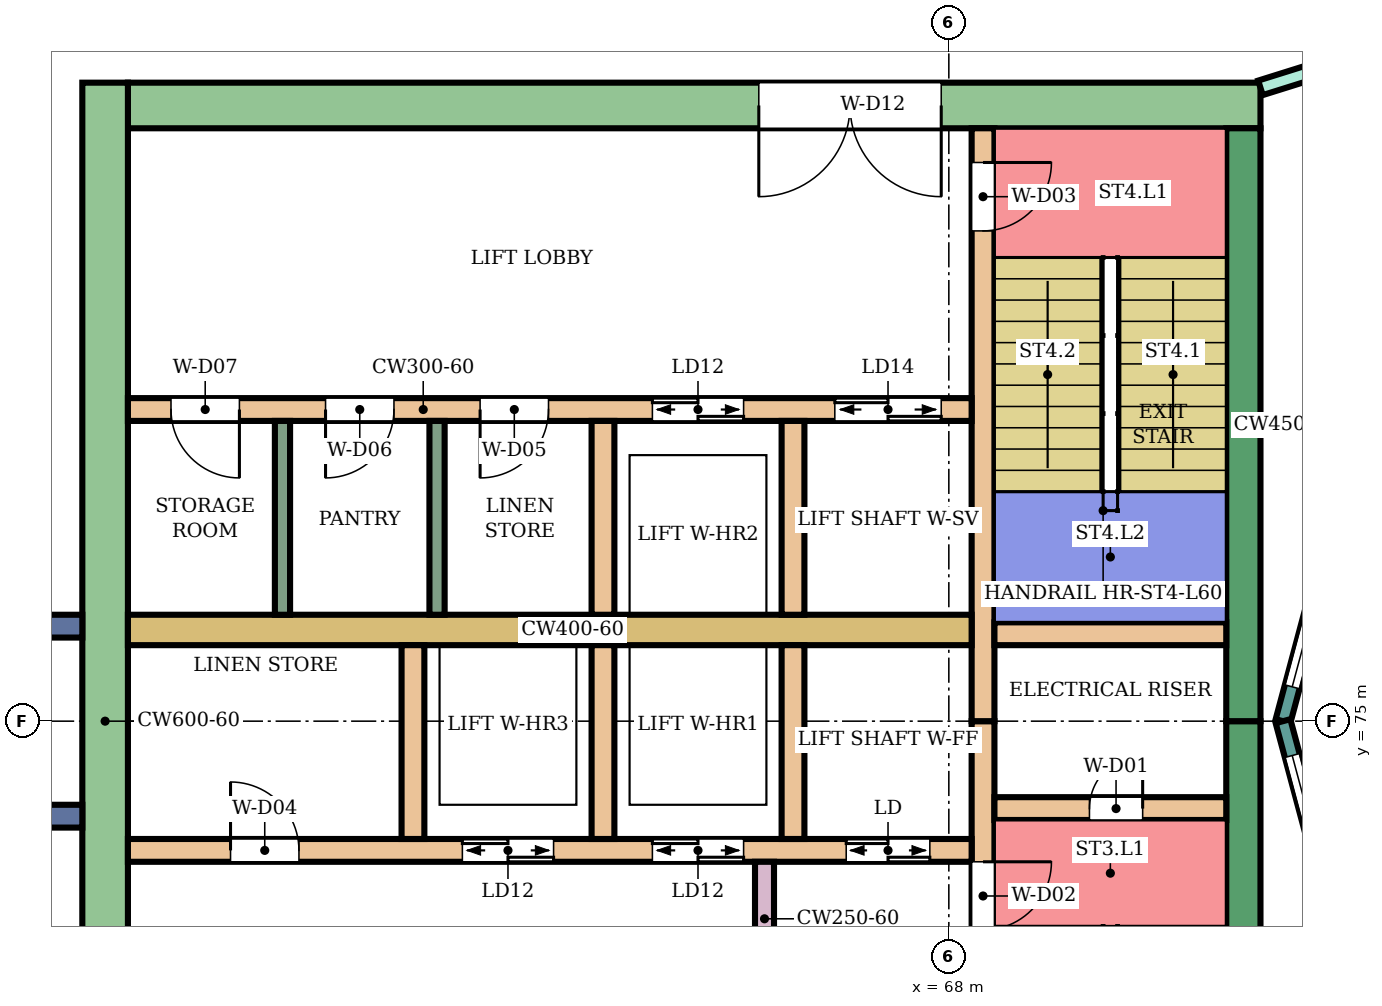
"""IFC4 building model, lengths in metres.
Left out: names, types, materials, properties, quantities, classifications, styles, units other than length and angle.
Written with IfcOpenShell. Run it as: python <this file> out.ifc"""

import sys

from ifc_helpers import new_model, si_unit, direction, frame, frame_2d, origin, place, context, subcontext, project, spatial, rectangle, extrude, element, fill, save


model = new_model("IFC4")
c1 = context("Model", 3, precision=1e-05, world=origin(), true_north=direction((0.0, 1.0)))
c2 = subcontext(c1, "Body", "Model", "MODEL_VIEW")
j1 = project(units=[si_unit("LENGTHUNIT", "METRE"), si_unit("PLANEANGLEUNIT", "RADIAN")], contexts=[c1])
p1 = place(None, origin())
s1 = spatial("IfcSite", under=j1, at=p1, CompositionType="ELEMENT")
p2 = place(p1, origin())
s2 = spatial("IfcBuilding", under=s1, at=p2, CompositionType="ELEMENT")
p3 = place(p2, frame((0.0, 0.0, 262.5)))
s3 = spatial("IfcBuildingStorey", under=s2, at=p3, CompositionType="ELEMENT", Elevation=262.5)
p4 = place(p3, frame((72.1, 83.1, 0.0), z_axis=(0.0, 0.0, 1.0), x_axis=(-1.0, 0.0, 0.0)))
e1 = element("IfcWall", 1, at=p4, inside=s3, PredefinedType="SHEAR", context=c2, shape_type="SweptSolid", body=[
    extrude(rectangle(XDim=14.9, YDim=0.6, at=frame_2d((7.45, 0.0))), origin(), (0.0, 0.0, 1.0), 3.88),
])
p5 = place(p4, frame((4.2, 0.0, 0.0)))
e2 = element("IfcOpeningElement", 2, at=p5, cuts=e1, PredefinedType="OPENING", context=c2, shape_type="SweptSolid", body=[
    extrude(rectangle(XDim=2.4, YDim=2.4, at=frame_2d((1.2, 1.2))), frame((0.0, 0.31, 0.0), z_axis=(0.0, -1.0, 0.0), x_axis=(1.0, 0.0, 0.0)), (0.0, 0.0, 1.0), 0.62),
])
for number, where, z_axis, x_axis in (
    (3, (71.875, 75.0, 0.0), (0.0, 0.0, 1.0), (0.0, -1.0, 0.0)),
    (4, (71.875, 82.8, 0.0), (0.0, 0.0, 1.0), (0.0, -1.0, 0.0)),
):
    element("IfcWall", number, at=place(p3, frame(where, z_axis=z_axis, x_axis=x_axis)), inside=s3, PredefinedType="SHEAR", context=c2, shape_type="SweptSolid", body=[
        extrude(rectangle(XDim=7.8, YDim=0.45, at=frame_2d((3.9, 0.0))), origin(), (0.0, 0.0, 1.0), 3.88),
    ])
p6 = place(p3, frame((56.9, 83.4, 0.0), z_axis=(0.0, 0.0, 1.0), x_axis=(0.0, -1.0, 0.0)))
e5 = element("IfcWall", 5, at=p6, inside=s3, PredefinedType="SHEAR", context=c2, shape_type="SweptSolid", body=[
    extrude(rectangle(XDim=16.8, YDim=0.6, at=frame_2d((8.4, 0.0))), origin(), (0.0, 0.0, 1.0), 3.88),
])
p7 = place(p3, frame((68.45, 75.0, 0.0), z_axis=(0.0, 0.0, 1.0), x_axis=(0.0, -1.0, 0.0)))
e6 = element("IfcWall", 6, at=p7, inside=s3, PredefinedType="SHEAR", context=c2, shape_type="SweptSolid", body=[
    extrude(rectangle(XDim=7.8, YDim=0.3, at=frame_2d((3.9, 0.0))), origin(), (0.0, 0.0, 1.0), 3.88),
])
p8 = place(p7, frame((1.85, 0.0, 0.0)))
e7 = element("IfcOpeningElement", 7, at=p8, cuts=e6, PredefinedType="OPENING", context=c2, shape_type="SweptSolid", body=[
    extrude(rectangle(XDim=0.9, YDim=2.1, at=frame_2d((0.45, 1.05))), frame((0.0, 0.16, 0.0), z_axis=(0.0, -1.0, 0.0), x_axis=(1.0, 0.0, 0.0)), (0.0, 0.0, 1.0), 0.32),
])
p9 = place(p3, frame((68.45, 82.8, 0.0), z_axis=(0.0, 0.0, 1.0), x_axis=(0.0, -1.0, 0.0)))
e8 = element("IfcWall", 8, at=p9, inside=s3, PredefinedType="SHEAR", context=c2, shape_type="SweptSolid", body=[
    extrude(rectangle(XDim=7.8, YDim=0.3, at=frame_2d((3.9, 0.0))), origin(), (0.0, 0.0, 1.0), 3.88),
])
p10 = place(p9, frame((0.45, 0.0, 0.0)))
e9 = element("IfcOpeningElement", 9, at=p10, cuts=e8, PredefinedType="OPENING", context=c2, shape_type="SweptSolid", body=[
    extrude(rectangle(XDim=0.9, YDim=2.1, at=frame_2d((0.45, 1.05))), frame((0.0, 0.16, 0.0), z_axis=(0.0, -1.0, 0.0), x_axis=(1.0, 0.0, 0.0)), (0.0, 0.0, 1.0), 0.32),
])
p11 = place(p3, frame((71.65, 73.85, 0.0), z_axis=(0.0, 0.0, 1.0), x_axis=(-1.0, 0.0, 0.0)))
e10 = element("IfcWall", 10, at=p11, inside=s3, PredefinedType="SHEAR", context=c2, shape_type="SweptSolid", body=[
    extrude(rectangle(XDim=3.05, YDim=0.3, at=frame_2d((1.525, 0.0))), origin(), (0.0, 0.0, 1.0), 3.88),
])
p12 = place(p11, frame((1.1, 0.0, 0.0)))
e11 = element("IfcOpeningElement", 11, at=p12, cuts=e10, PredefinedType="OPENING", context=c2, shape_type="SweptSolid", body=[
    extrude(rectangle(XDim=0.7, YDim=2.0, at=frame_2d((0.35, 1.0))), frame((0.0, 0.16, 0.0), z_axis=(0.0, -1.0, 0.0), x_axis=(1.0, 0.0, 0.0)), (0.0, 0.0, 1.0), 0.32),
])
p13 = place(p3, frame((71.65, 76.15, 0.0), z_axis=(0.0, 0.0, 1.0), x_axis=(-1.0, 0.0, 0.0)))
e12 = element("IfcWall", 12, at=p13, inside=s3, PredefinedType="SHEAR", context=c2, shape_type="SweptSolid", body=[
    extrude(rectangle(XDim=3.05, YDim=0.3, at=frame_2d((1.525, 0.0))), origin(), (0.0, 0.0, 1.0), 3.88),
])
p14 = place(p3, frame((68.3, 73.3, 0.0), z_axis=(0.0, 0.0, 1.0), x_axis=(-1.0, 0.0, 0.0)))
e13 = element("IfcWall", 13, at=p14, inside=s3, PredefinedType="SHEAR", context=c2, shape_type="SweptSolid", body=[
    extrude(rectangle(XDim=11.1, YDim=0.3, at=frame_2d((5.55, 0.0))), origin(), (0.0, 0.0, 1.0), 3.88),
])
p15 = place(p14, frame((0.55, 0.0, 0.0)))
e14 = element("IfcOpeningElement", 14, at=p15, cuts=e13, PredefinedType="OPENING", context=c2, shape_type="SweptSolid", body=[
    extrude(rectangle(XDim=1.1, YDim=2.1, at=frame_2d((0.55, 1.05))), frame((0.0, 0.16, 0.0), z_axis=(0.0, -1.0, 0.0), x_axis=(1.0, 0.0, 0.0)), (0.0, 0.0, 1.0), 0.32),
])
p16 = place(p14, frame((3.0, 0.0, 0.0)))
e15 = element("IfcOpeningElement", 15, at=p16, cuts=e13, PredefinedType="OPENING", context=c2, shape_type="SweptSolid", body=[
    extrude(rectangle(XDim=1.2, YDim=2.1, at=frame_2d((0.6, 1.05))), frame((0.0, 0.16, 0.0), z_axis=(0.0, -1.0, 0.0), x_axis=(1.0, 0.0, 0.0)), (0.0, 0.0, 1.0), 0.32),
])
p17 = place(p14, frame((5.5, 0.0, 0.0)))
e16 = element("IfcOpeningElement", 16, at=p17, cuts=e13, PredefinedType="OPENING", context=c2, shape_type="SweptSolid", body=[
    extrude(rectangle(XDim=1.2, YDim=2.1, at=frame_2d((0.6, 1.05))), frame((0.0, 0.16, 0.0), z_axis=(0.0, -1.0, 0.0), x_axis=(1.0, 0.0, 0.0)), (0.0, 0.0, 1.0), 0.32),
])
p18 = place(p14, frame((8.85, 0.0, 0.0)))
e17 = element("IfcOpeningElement", 17, at=p18, cuts=e13, PredefinedType="OPENING", context=c2, shape_type="SweptSolid", body=[
    extrude(rectangle(XDim=0.9, YDim=2.1, at=frame_2d((0.45, 1.05))), frame((0.0, 0.16, 0.0), z_axis=(0.0, -1.0, 0.0), x_axis=(1.0, 0.0, 0.0)), (0.0, 0.0, 1.0), 0.32),
])
p19 = place(p3, frame((68.3, 76.2, 0.0), z_axis=(0.0, 0.0, 1.0), x_axis=(-1.0, 0.0, 0.0)))
e18 = element("IfcWall", 18, at=p19, inside=s3, PredefinedType="SHEAR", context=c2, shape_type="SweptSolid", body=[
    extrude(rectangle(XDim=11.1, YDim=0.4, at=frame_2d((5.55, 0.0))), origin(), (0.0, 0.0, 1.0), 3.88),
])
p20 = place(p3, frame((68.3, 79.1, 0.0), z_axis=(0.0, 0.0, 1.0), x_axis=(-1.0, 0.0, 0.0)))
e19 = element("IfcWall", 19, at=p20, inside=s3, PredefinedType="SHEAR", context=c2, shape_type="SweptSolid", body=[
    extrude(rectangle(XDim=11.1, YDim=0.3, at=frame_2d((5.55, 0.0))), origin(), (0.0, 0.0, 1.0), 3.88),
])
p21 = place(p20, frame((0.4, 0.0, 0.0)))
e20 = element("IfcOpeningElement", 20, at=p21, cuts=e19, PredefinedType="OPENING", context=c2, shape_type="SweptSolid", body=[
    extrude(rectangle(XDim=1.4, YDim=2.1, at=frame_2d((0.7, 1.05))), frame((0.0, 0.16, 0.0), z_axis=(0.0, -1.0, 0.0), x_axis=(1.0, 0.0, 0.0)), (0.0, 0.0, 1.0), 0.32),
])
p22 = place(p20, frame((3.0, 0.0, 0.0)))
e21 = element("IfcOpeningElement", 21, at=p22, cuts=e19, PredefinedType="OPENING", context=c2, shape_type="SweptSolid", body=[
    extrude(rectangle(XDim=1.2, YDim=2.1, at=frame_2d((0.6, 1.05))), frame((0.0, 0.16, 0.0), z_axis=(0.0, -1.0, 0.0), x_axis=(1.0, 0.0, 0.0)), (0.0, 0.0, 1.0), 0.32),
])
p23 = place(p20, frame((5.567, 0.0, 0.0)))
e22 = element("IfcOpeningElement", 22, at=p23, cuts=e19, PredefinedType="OPENING", context=c2, shape_type="SweptSolid", body=[
    extrude(rectangle(XDim=0.9, YDim=2.1, at=frame_2d((0.45, 1.05))), frame((0.0, 0.16, 0.0), z_axis=(0.0, -1.0, 0.0), x_axis=(1.0, 0.0, 0.0)), (0.0, 0.0, 1.0), 0.32),
])
p24 = place(p20, frame((7.6, 0.0, 0.0)))
e23 = element("IfcOpeningElement", 23, at=p24, cuts=e19, PredefinedType="OPENING", context=c2, shape_type="SweptSolid", body=[
    extrude(rectangle(XDim=0.9, YDim=2.1, at=frame_2d((0.45, 1.05))), frame((0.0, 0.16, 0.0), z_axis=(0.0, -1.0, 0.0), x_axis=(1.0, 0.0, 0.0)), (0.0, 0.0, 1.0), 0.32),
])
p25 = place(p20, frame((9.633, 0.0, 0.0)))
e24 = element("IfcOpeningElement", 24, at=p25, cuts=e19, PredefinedType="OPENING", context=c2, shape_type="SweptSolid", body=[
    extrude(rectangle(XDim=0.9, YDim=2.1, at=frame_2d((0.45, 1.05))), frame((0.0, 0.16, 0.0), z_axis=(0.0, -1.0, 0.0), x_axis=(1.0, 0.0, 0.0)), (0.0, 0.0, 1.0), 0.32),
])
for number, where, z_axis, x_axis in (
    (25, (65.95, 76.0, 0.0), (0.0, 0.0, 1.0), (0.0, -1.0, 0.0)),
    (26, (63.45, 76.0, 0.0), (0.0, 0.0, 1.0), (0.0, -1.0, 0.0)),
    (27, (60.95, 76.0, 0.0), (0.0, 0.0, 1.0), (0.0, -1.0, 0.0)),
    (28, (65.95, 78.95, 0.0), (0.0, 0.0, 1.0), (0.0, -1.0, 0.0)),
    (29, (63.45, 78.95, 0.0), (0.0, 0.0, 1.0), (0.0, -1.0, 0.0)),
):
    element("IfcWall", number, at=place(p3, frame(where, z_axis=z_axis, x_axis=x_axis)), inside=s3, PredefinedType="SHEAR", context=c2, shape_type="SweptSolid", body=[
        extrude(rectangle(XDim=2.55, YDim=0.3, at=frame_2d((1.275, 0.0))), origin(), (0.0, 0.0, 1.0), 3.88),
    ])
p26 = place(p3, frame((65.575, 73.15, 0.0), z_axis=(0.0, 0.0, 1.0), x_axis=(0.0, -1.0, 0.0)))
e30 = element("IfcWall", 30, at=p26, inside=s3, PredefinedType="SHEAR", context=c2, shape_type="SweptSolid", body=[
    extrude(rectangle(XDim=1.5, YDim=0.25, at=frame_2d((0.75, 0.0))), origin(), (0.0, 0.0, 1.0), 3.88),
])
for number, where, z_axis, x_axis in (
    (31, (56.6, 76.25, 0.0), (0.0, 0.0, 1.0), (-1.0, 0.0, 0.0)),
    (32, (56.6, 73.75, 0.0), (0.0, 0.0, 1.0), (-1.0, 0.0, 0.0)),
):
    element("IfcWall", number, at=place(p3, frame(where, z_axis=z_axis, x_axis=x_axis)), inside=s3, PredefinedType="NOTDEFINED", context=c2, shape_type="SweptSolid", body=[
        extrude(rectangle(XDim=2.416, YDim=0.3, at=frame_2d((1.208, 0.0))), origin(), (0.0, 0.0, 1.0), 4.2),
    ])
p27 = place(p3, frame((73.415, 78.802, 0.0), z_axis=(0.0, 0.0, 1.0), x_axis=(-0.258789828301, -0.965933654434, 0.0)))
e33 = element("IfcWall", 33, at=p27, inside=s3, PredefinedType="NOTDEFINED", context=c2, shape_type="SweptSolid", body=[
    extrude(rectangle(XDim=3.936, YDim=0.2, at=frame_2d((1.968, 0.0))), origin(), (0.0, 0.0, 1.0), 4.2),
])
p28 = place(p27, frame((0.468, 0.0, 0.9)))
e34 = element("IfcOpeningElement", 34, at=p28, cuts=e33, PredefinedType="OPENING", context=c2, shape_type="SweptSolid", body=[
    extrude(rectangle(XDim=3.0, YDim=2.3, at=frame_2d((1.5, 1.15))), frame((0.0, 0.11, 0.0), z_axis=(0.0, -1.0, 0.0), x_axis=(1.0, 0.0, 0.0)), (0.0, 0.0, 1.0), 0.22),
])
p29 = place(p3, frame((72.396, 75.0, 0.0), z_axis=(0.0, 0.0, 1.0), x_axis=(0.258789828301, -0.965933654434, 0.0)))
e35 = element("IfcWall", 35, at=p29, inside=s3, PredefinedType="NOTDEFINED", context=c2, shape_type="SweptSolid", body=[
    extrude(rectangle(XDim=3.936, YDim=0.2, at=frame_2d((1.968, 0.0))), origin(), (0.0, 0.0, 1.0), 4.2),
])
p30 = place(p29, frame((0.468, 0.0, 0.9)))
e36 = element("IfcOpeningElement", 36, at=p30, cuts=e35, PredefinedType="OPENING", context=c2, shape_type="SweptSolid", body=[
    extrude(rectangle(XDim=3.0, YDim=2.3, at=frame_2d((1.5, 1.15))), frame((0.0, 0.11, 0.0), z_axis=(0.0, -1.0, 0.0), x_axis=(1.0, 0.0, 0.0)), (0.0, 0.0, 1.0), 0.22),
])
p31 = place(p3, frame((72.1, 83.332, 0.0), z_axis=(0.0, 0.0, 1.0), x_axis=(0.954233106619, 0.299063836383, 0.0)))
e37 = element("IfcWall", 37, at=p31, inside=s3, PredefinedType="PARTITIONING", context=c2, shape_type="SweptSolid", body=[
    extrude(rectangle(XDim=2.414, YDim=0.2, at=frame_2d((1.207, 0.0))), origin(), (0.0, 0.0, 1.0), 3.75),
])
p32 = place(p31, frame((0.762, 0.0, 0.0)))
e38 = element("IfcOpeningElement", 38, at=p32, cuts=e37, PredefinedType="OPENING", context=c2, shape_type="SweptSolid", body=[
    extrude(rectangle(XDim=0.9, YDim=2.1, at=frame_2d((0.45, 1.05))), frame((0.0, 0.11, 0.0), z_axis=(0.0, -1.0, 0.0), x_axis=(1.0, 0.0, 0.0)), (0.0, 0.0, 1.0), 0.22),
])
for number, where, z_axis, x_axis in (
    (39, (61.267, 78.95, 0.0), (0.0, 0.0, 1.0), (0.0, -1.0, 0.0)),
    (40, (59.233, 78.95, 0.0), (0.0, 0.0, 1.0), (0.0, -1.0, 0.0)),
):
    element("IfcWall", number, at=place(p3, frame(where, z_axis=z_axis, x_axis=x_axis)), inside=s3, PredefinedType="PARTITIONING", context=c2, shape_type="SweptSolid", body=[
        extrude(rectangle(XDim=2.55, YDim=0.2, at=frame_2d((1.275, 0.0))), origin(), (0.0, 0.0, 1.0), 3.88),
    ])
p33 = place(p28, origin())
e41 = element("IfcWindow", 41, at=p33, inside=s3, PartitioningType="SINGLE_PANEL", PredefinedType="WINDOW", context=c2, shape_type="SweptSolid", body=[
    extrude(rectangle(XDim=3.0, YDim=2.3, at=frame_2d((1.5, 1.15))), frame((0.0, 0.03, 0.0), z_axis=(0.0, -1.0, 0.0), x_axis=(1.0, 0.0, 0.0)), (0.0, 0.0, 1.0), 0.06),
])
fill(e34, e41)
p34 = place(p30, origin())
e42 = element("IfcWindow", 42, at=p34, inside=s3, PartitioningType="SINGLE_PANEL", PredefinedType="WINDOW", context=c2, shape_type="SweptSolid", body=[
    extrude(rectangle(XDim=3.0, YDim=2.3, at=frame_2d((1.5, 1.15))), frame((0.0, 0.03, 0.0), z_axis=(0.0, -1.0, 0.0), x_axis=(1.0, 0.0, 0.0)), (0.0, 0.0, 1.0), 0.06),
])
fill(e36, e42)
p35 = place(p12, frame((0.7, 0.0, 0.0), z_axis=(0.0, 0.0, 1.0), x_axis=(-1.0, 0.0, 0.0)))
e43 = element("IfcDoor", 43, at=p35, inside=s3, OperationType="SINGLE_SWING_RIGHT", PredefinedType="DOOR", context=c2, shape_type="SweptSolid", body=[
    extrude(rectangle(XDim=0.7, YDim=2.0, at=frame_2d((0.35, 1.0))), frame((0.0, 0.025, 0.0), z_axis=(0.0, -1.0, 0.0), x_axis=(1.0, 0.0, 0.0)), (0.0, 0.0, 1.0), 0.05),
])
fill(e11, e43)
p36 = place(p8, origin())
e44 = element("IfcDoor", 44, at=p36, inside=s3, OperationType="SINGLE_SWING_LEFT", PredefinedType="DOOR", context=c2, shape_type="SweptSolid", body=[
    extrude(rectangle(XDim=0.9, YDim=2.1, at=frame_2d((0.45, 1.05))), frame((0.0, 0.025, 0.0), z_axis=(0.0, -1.0, 0.0), x_axis=(1.0, 0.0, 0.0)), (0.0, 0.0, 1.0), 0.05),
])
fill(e7, e44)
p37 = place(p10, origin())
e45 = element("IfcDoor", 45, at=p37, inside=s3, OperationType="SINGLE_SWING_LEFT", PredefinedType="DOOR", context=c2, shape_type="SweptSolid", body=[
    extrude(rectangle(XDim=0.9, YDim=2.1, at=frame_2d((0.45, 1.05))), frame((0.0, 0.025, 0.0), z_axis=(0.0, -1.0, 0.0), x_axis=(1.0, 0.0, 0.0)), (0.0, 0.0, 1.0), 0.05),
])
fill(e9, e45)
p38 = place(p15, origin())
e46 = element("IfcDoor", 46, at=p38, inside=s3, OperationType="DOUBLE_DOOR_SLIDING", PredefinedType="DOOR", context=c2, shape_type="SweptSolid", body=[
    extrude(rectangle(XDim=1.1, YDim=2.1, at=frame_2d((0.55, 1.05))), frame((0.0, 0.025, 0.0), z_axis=(0.0, -1.0, 0.0), x_axis=(1.0, 0.0, 0.0)), (0.0, 0.0, 1.0), 0.05),
])
fill(e14, e46)
p39 = place(p16, origin())
e47 = element("IfcDoor", 47, at=p39, inside=s3, OperationType="DOUBLE_DOOR_SLIDING", PredefinedType="DOOR", context=c2, shape_type="SweptSolid", body=[
    extrude(rectangle(XDim=1.2, YDim=2.1, at=frame_2d((0.6, 1.05))), frame((0.0, 0.025, 0.0), z_axis=(0.0, -1.0, 0.0), x_axis=(1.0, 0.0, 0.0)), (0.0, 0.0, 1.0), 0.05),
])
fill(e15, e47)
p40 = place(p17, origin())
e48 = element("IfcDoor", 48, at=p40, inside=s3, OperationType="DOUBLE_DOOR_SLIDING", PredefinedType="DOOR", context=c2, shape_type="SweptSolid", body=[
    extrude(rectangle(XDim=1.2, YDim=2.1, at=frame_2d((0.6, 1.05))), frame((0.0, 0.025, 0.0), z_axis=(0.0, -1.0, 0.0), x_axis=(1.0, 0.0, 0.0)), (0.0, 0.0, 1.0), 0.05),
])
fill(e16, e48)
p41 = place(p18, frame((0.9, 0.0, 0.0), z_axis=(0.0, 0.0, 1.0), x_axis=(-1.0, 0.0, 0.0)))
e49 = element("IfcDoor", 49, at=p41, inside=s3, OperationType="SINGLE_SWING_LEFT", PredefinedType="DOOR", context=c2, shape_type="SweptSolid", body=[
    extrude(rectangle(XDim=0.9, YDim=2.1, at=frame_2d((0.45, 1.05))), frame((0.0, 0.025, 0.0), z_axis=(0.0, -1.0, 0.0), x_axis=(1.0, 0.0, 0.0)), (0.0, 0.0, 1.0), 0.05),
])
fill(e17, e49)
p42 = place(p21, origin())
e50 = element("IfcDoor", 50, at=p42, inside=s3, OperationType="DOUBLE_DOOR_SLIDING", PredefinedType="DOOR", context=c2, shape_type="SweptSolid", body=[
    extrude(rectangle(XDim=1.4, YDim=2.1, at=frame_2d((0.7, 1.05))), frame((0.0, 0.025, 0.0), z_axis=(0.0, -1.0, 0.0), x_axis=(1.0, 0.0, 0.0)), (0.0, 0.0, 1.0), 0.05),
])
fill(e20, e50)
p43 = place(p22, origin())
e51 = element("IfcDoor", 51, at=p43, inside=s3, OperationType="DOUBLE_DOOR_SLIDING", PredefinedType="DOOR", context=c2, shape_type="SweptSolid", body=[
    extrude(rectangle(XDim=1.2, YDim=2.1, at=frame_2d((0.6, 1.05))), frame((0.0, 0.025, 0.0), z_axis=(0.0, -1.0, 0.0), x_axis=(1.0, 0.0, 0.0)), (0.0, 0.0, 1.0), 0.05),
])
fill(e21, e51)
p44 = place(p23, origin())
e52 = element("IfcDoor", 52, at=p44, inside=s3, OperationType="SINGLE_SWING_RIGHT", PredefinedType="DOOR", context=c2, shape_type="SweptSolid", body=[
    extrude(rectangle(XDim=0.9, YDim=2.1, at=frame_2d((0.45, 1.05))), frame((0.0, 0.025, 0.0), z_axis=(0.0, -1.0, 0.0), x_axis=(1.0, 0.0, 0.0)), (0.0, 0.0, 1.0), 0.05),
])
fill(e22, e52)
p45 = place(p24, origin())
e53 = element("IfcDoor", 53, at=p45, inside=s3, OperationType="SINGLE_SWING_RIGHT", PredefinedType="DOOR", context=c2, shape_type="SweptSolid", body=[
    extrude(rectangle(XDim=0.9, YDim=2.1, at=frame_2d((0.45, 1.05))), frame((0.0, 0.025, 0.0), z_axis=(0.0, -1.0, 0.0), x_axis=(1.0, 0.0, 0.0)), (0.0, 0.0, 1.0), 0.05),
])
fill(e23, e53)
p46 = place(p25, origin())
e54 = element("IfcDoor", 54, at=p46, inside=s3, OperationType="SINGLE_SWING_LEFT", PredefinedType="DOOR", context=c2, shape_type="SweptSolid", body=[
    extrude(rectangle(XDim=0.9, YDim=2.1, at=frame_2d((0.45, 1.05))), frame((0.0, 0.025, 0.0), z_axis=(0.0, -1.0, 0.0), x_axis=(1.0, 0.0, 0.0)), (0.0, 0.0, 1.0), 0.05),
])
fill(e24, e54)
p47 = place(p5, origin())
e55 = element("IfcDoor", 55, at=p47, inside=s3, OperationType="DOUBLE_DOOR_SINGLE_SWING", PredefinedType="DOOR", context=c2, shape_type="SweptSolid", body=[
    extrude(rectangle(XDim=2.4, YDim=2.4, at=frame_2d((1.2, 1.2))), frame((0.0, 0.025, 0.0), z_axis=(0.0, -1.0, 0.0), x_axis=(1.0, 0.0, 0.0)), (0.0, 0.0, 1.0), 0.05),
])
fill(e2, e55)
save(model, sys.argv[1])
